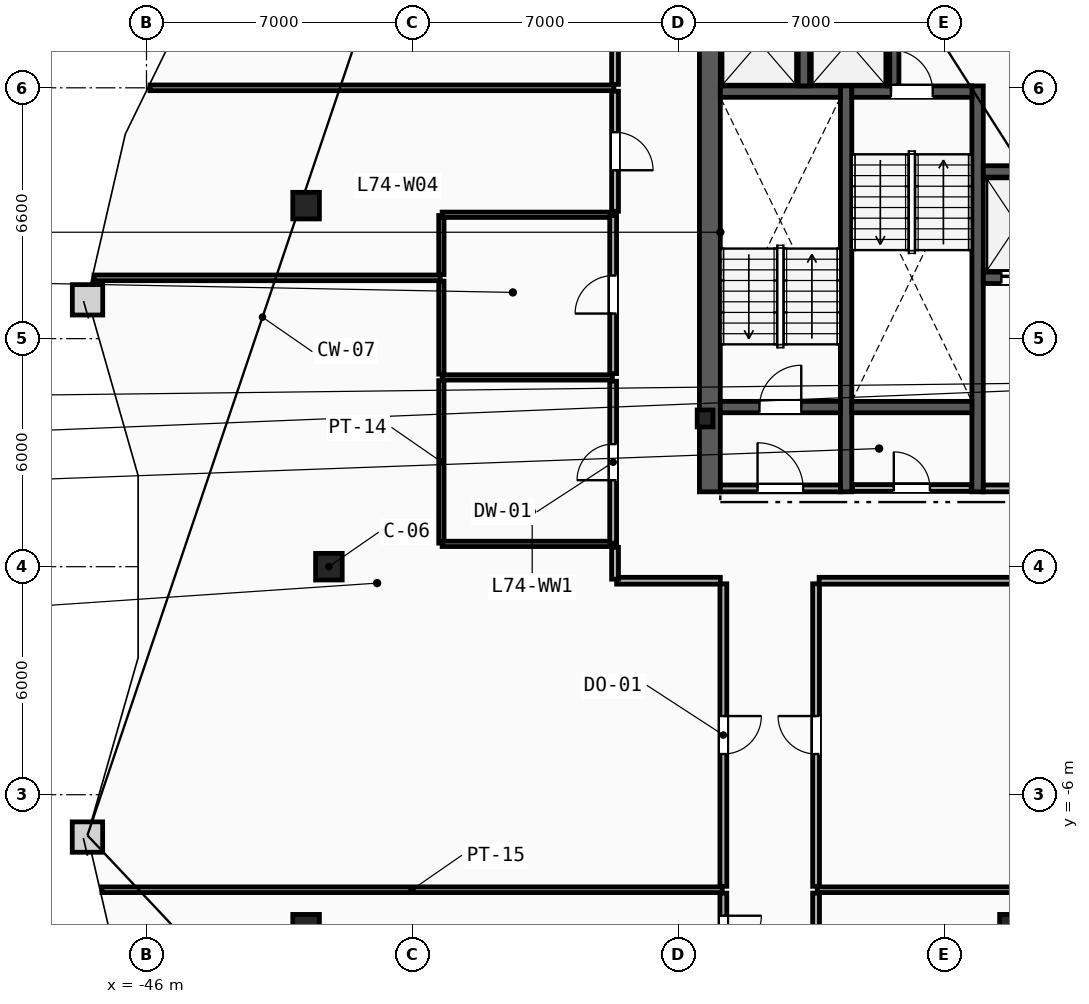
"""IFC4 building model, lengths in metres.
Left out: names, types, materials, properties, quantities, classifications, styles, units other than length and angle.
Written with IfcOpenShell. Run it as: python <this file> out.ifc"""

import sys

from ifc_helpers import new_model, si_unit, direction, frame, frame_2d, origin, origin_2d, place, context, subcontext, project, spatial, rectangle, i_section, extrude, element, fill, save


model = new_model("IFC4")
c1 = context("Model", 3, precision=1e-05, world=origin(), true_north=direction((0.0, 1.0)))
c2 = subcontext(c1, "Body", "Model", "MODEL_VIEW")
j1 = project(units=[si_unit("LENGTHUNIT", "METRE"), si_unit("PLANEANGLEUNIT", "RADIAN")], contexts=[c1])
p1 = place(None, origin())
s1 = spatial("IfcSite", under=j1, at=p1, CompositionType="ELEMENT")
p2 = place(p1, origin())
s2 = spatial("IfcBuilding", under=s1, at=p2, CompositionType="ELEMENT")
p3 = place(p2, frame((0.0, 0.0, 279.2)))
s3 = spatial("IfcBuildingStorey", under=s2, at=p3, CompositionType="ELEMENT", Elevation=279.2)
p4 = place(p3, frame((-31.3, 3.9, 0.0), z_axis=(0.0, 0.0, 1.0), x_axis=(1.0, 0.0, 0.0)))
e1 = element("IfcColumn", 1, at=p4, inside=s3, PredefinedType="COLUMN", context=c2, shape_type="SweptSolid", body=[
    extrude(i_section(OverallWidth=0.416, OverallDepth=0.446, WebThickness=0.039, FlangeThickness=0.063, FilletRadius=0.018, at=origin_2d()), origin(), (0.0, 0.0, 1.0), 3.6),
])
for number, where, z_axis, x_axis in (
    (2, (-41.2, 0.0, 0.0), (0.0, 0.0, 1.0), (1.0, 0.0, 0.0)),
    (3, (-41.8, 9.5, 0.0), (0.0, 0.0, 1.0), (1.0, 0.0, 0.0)),
    (4, (-41.8, -9.5, 0.0), (0.0, 0.0, 1.0), (1.0, 0.0, 0.0)),
    (5, (-23.2, -9.5, 0.0), (0.0, 0.0, 1.0), (1.0, 0.0, 0.0)),
):
    element("IfcColumn", number, at=place(p3, frame(where, z_axis=z_axis, x_axis=x_axis)), inside=s3, PredefinedType="COLUMN", context=c2, shape_type="SweptSolid", body=[
        extrude(rectangle(XDim=0.7, YDim=0.7, at=origin_2d()), origin(), (0.0, 0.0, 1.0), 3.6),
    ])
p5 = place(p3, frame((-31.175, 1.97, 0.0), z_axis=(0.0, 0.0, 1.0), x_axis=(0.0, 1.0, 0.0)))
e6 = element("IfcWall", 6, at=p5, inside=s3, PredefinedType="SHEAR", context=c2, shape_type="SweptSolid", body=[
    extrude(rectangle(XDim=13.33, YDim=0.55, at=frame_2d((6.665, 0.0))), origin(), (0.0, 0.0, 1.0), 3.34),
])
for number, where, z_axis, x_axis in (
    (7, (-27.59, 1.97, 0.0), (0.0, 0.0, 1.0), (0.0, 1.0, 0.0)),
    (8, (-24.13, 1.97, 0.0), (0.0, 0.0, 1.0), (0.0, 1.0, 0.0)),
):
    element("IfcWall", number, at=place(p3, frame(where, z_axis=z_axis, x_axis=x_axis)), inside=s3, PredefinedType="SHEAR", context=c2, shape_type="SweptSolid", body=[
        extrude(rectangle(XDim=10.68, YDim=0.3, at=frame_2d((5.34, 0.0))), origin(), (0.0, 0.0, 1.0), 3.34),
    ])
p6 = place(p3, frame((-30.9, 4.2, 0.0), z_axis=(0.0, 0.0, 1.0), x_axis=(1.0, 0.0, 0.0)))
e9 = element("IfcWall", 9, at=p6, inside=s3, PredefinedType="SHEAR", context=c2, shape_type="SweptSolid", body=[
    extrude(rectangle(XDim=3.16, YDim=0.3, at=frame_2d((1.58, 0.0))), origin(), (0.0, 0.0, 1.0), 3.34),
])
p7 = place(p6, frame((1.03, 0.0, 0.0)))
e10 = element("IfcOpeningElement", 10, at=p7, cuts=e9, PredefinedType="OPENING", context=c2, shape_type="SweptSolid", body=[
    extrude(rectangle(XDim=1.1, YDim=2.15, at=frame_2d((0.55, 1.075))), frame((0.0, 0.16, 0.0), z_axis=(0.0, -1.0, 0.0), x_axis=(1.0, 0.0, 0.0)), (0.0, 0.0, 1.0), 0.32),
])
p8 = place(p3, frame((-30.9, 12.5, 0.0), z_axis=(0.0, 0.0, 1.0), x_axis=(1.0, 0.0, 0.0)))
e11 = element("IfcWall", 11, at=p8, inside=s3, PredefinedType="SHEAR", context=c2, shape_type="SweptSolid", body=[
    extrude(rectangle(XDim=3.16, YDim=0.3, at=frame_2d((1.58, 0.0))), origin(), (0.0, 0.0, 1.0), 3.34),
])
p9 = place(p3, frame((-27.44, 12.5, 0.0), z_axis=(0.0, 0.0, 1.0), x_axis=(1.0, 0.0, 0.0)))
e12 = element("IfcWall", 12, at=p9, inside=s3, PredefinedType="SHEAR", context=c2, shape_type="SweptSolid", body=[
    extrude(rectangle(XDim=3.16, YDim=0.3, at=frame_2d((1.58, 0.0))), origin(), (0.0, 0.0, 1.0), 3.34),
])
p10 = place(p9, frame((1.03, 0.0, 0.0)))
e13 = element("IfcOpeningElement", 13, at=p10, cuts=e12, PredefinedType="OPENING", context=c2, shape_type="SweptSolid", body=[
    extrude(rectangle(XDim=1.1, YDim=2.15, at=frame_2d((0.55, 1.075))), frame((0.0, 0.16, 0.0), z_axis=(0.0, -1.0, 0.0), x_axis=(1.0, 0.0, 0.0)), (0.0, 0.0, 1.0), 0.32),
])
p11 = place(p3, frame((-27.44, 4.2, 0.0), z_axis=(0.0, 0.0, 1.0), x_axis=(1.0, 0.0, 0.0)))
e14 = element("IfcWall", 14, at=p11, inside=s3, PredefinedType="SHEAR", context=c2, shape_type="SweptSolid", body=[
    extrude(rectangle(XDim=3.16, YDim=0.3, at=frame_2d((1.58, 0.0))), origin(), (0.0, 0.0, 1.0), 3.34),
])
p12 = place(p3, frame((-23.98, 2.06, 0.0), z_axis=(0.0, 0.0, 1.0), x_axis=(1.0, 0.0, 0.0)))
e15 = element("IfcWall", 15, at=p12, inside=s3, PredefinedType="PARTITIONING", context=c2, shape_type="SweptSolid", body=[
    extrude(rectangle(XDim=3.0, YDim=0.18, at=frame_2d((1.5, 0.0))), origin(), (0.0, 0.0, 1.0), 3.34),
])
p13 = place(p12, frame((0.9, 0.0, 0.0)))
e16 = element("IfcOpeningElement", 16, at=p13, cuts=e15, PredefinedType="OPENING", context=c2, shape_type="SweptSolid", body=[
    extrude(rectangle(XDim=1.2, YDim=2.15, at=frame_2d((0.6, 1.075))), frame((0.0, 0.1, 0.0), z_axis=(0.0, -1.0, 0.0), x_axis=(1.0, 0.0, 0.0)), (0.0, 0.0, 1.0), 0.2),
])
p14 = place(p3, frame((-30.9, 2.06, 0.0), z_axis=(0.0, 0.0, 1.0), x_axis=(1.0, 0.0, 0.0)))
e17 = element("IfcWall", 17, at=p14, inside=s3, PredefinedType="PARTITIONING", context=c2, shape_type="SweptSolid", body=[
    extrude(rectangle(XDim=3.16, YDim=0.18, at=frame_2d((1.58, 0.0))), origin(), (0.0, 0.0, 1.0), 3.34),
])
p15 = place(p14, frame((0.98, 0.0, 0.0)))
e18 = element("IfcOpeningElement", 18, at=p15, cuts=e17, PredefinedType="OPENING", context=c2, shape_type="SweptSolid", body=[
    extrude(rectangle(XDim=1.2, YDim=2.15, at=frame_2d((0.6, 1.075))), frame((0.0, 0.1, 0.0), z_axis=(0.0, -1.0, 0.0), x_axis=(1.0, 0.0, 0.0)), (0.0, 0.0, 1.0), 0.2),
])
p16 = place(p3, frame((-23.98, 7.6, 0.0), z_axis=(0.0, 0.0, 1.0), x_axis=(1.0, 0.0, 0.0)))
e19 = element("IfcWall", 19, at=p16, inside=s3, PredefinedType="SHEAR", context=c2, shape_type="SweptSolid", body=[
    extrude(rectangle(XDim=2.1, YDim=0.3, at=frame_2d((1.05, 0.0))), origin(), (0.0, 0.0, 1.0), 3.34),
])
p17 = place(p16, frame((0.475, 0.0, 0.0)))
e20 = element("IfcOpeningElement", 20, at=p17, cuts=e19, PredefinedType="OPENING", context=c2, shape_type="SweptSolid", body=[
    extrude(rectangle(XDim=1.15, YDim=2.2, at=frame_2d((0.575, 1.1))), frame((0.0, 0.16, 0.0), z_axis=(0.0, -1.0, 0.0), x_axis=(1.0, 0.0, 0.0)), (0.0, 0.0, 1.0), 0.32),
])
p18 = place(p3, frame((-23.98, 10.4, 0.0), z_axis=(0.0, 0.0, 1.0), x_axis=(1.0, 0.0, 0.0)))
e21 = element("IfcWall", 21, at=p18, inside=s3, PredefinedType="SHEAR", context=c2, shape_type="SweptSolid", body=[
    extrude(rectangle(XDim=2.1, YDim=0.3, at=frame_2d((1.05, 0.0))), origin(), (0.0, 0.0, 1.0), 3.34),
])
for number, where, z_axis, x_axis in (
    (22, (-28.7, 12.65, 0.0), (0.0, 0.0, 1.0), (0.0, 1.0, 0.0)),
    (23, (-26.35, 12.65, 0.0), (0.0, 0.0, 1.0), (0.0, 1.0, 0.0)),
):
    element("IfcWall", number, at=place(p3, frame(where, z_axis=z_axis, x_axis=x_axis)), inside=s3, PredefinedType="SHEAR", context=c2, shape_type="SweptSolid", body=[
        extrude(rectangle(XDim=2.3, YDim=0.3, at=frame_2d((1.15, 0.0))), origin(), (0.0, 0.0, 1.0), 3.34),
    ])
p19 = place(p3, frame((-27.42, 2.07, 0.0), z_axis=(0.0, 0.0, 1.0), x_axis=(1.0, 0.0, 0.0)))
e24 = element("IfcWall", 24, at=p19, inside=s3, PredefinedType="PARTITIONING", context=c2, shape_type="SweptSolid", body=[
    extrude(rectangle(XDim=3.12, YDim=0.18, at=frame_2d((1.56, 0.0))), origin(), (0.0, 0.0, 1.0), 3.34),
])
p20 = place(p19, frame((1.085, 0.0, 0.0)))
e25 = element("IfcOpeningElement", 25, at=p20, cuts=e24, PredefinedType="OPENING", context=c2, shape_type="SweptSolid", body=[
    extrude(rectangle(XDim=0.95, YDim=2.1, at=frame_2d((0.475, 1.05))), frame((0.0, 0.1, 0.0), z_axis=(0.0, -1.0, 0.0), x_axis=(1.0, 0.0, 0.0)), (0.0, 0.0, 1.0), 0.2),
])
p21 = place(p3, frame((-38.24, 0.62, 0.0), z_axis=(0.0, 0.0, 1.0), x_axis=(0.0, 1.0, 0.0)))
e26 = element("IfcWall", 26, at=p21, inside=s3, PredefinedType="PARTITIONING", context=c2, shape_type="SweptSolid", body=[
    extrude(rectangle(XDim=4.275, YDim=0.14, at=frame_2d((2.137, 0.0))), origin(), (0.0, 0.0, 1.0), 3.34),
])
p22 = place(p3, frame((-38.24, 5.065, 0.0), z_axis=(0.0, 0.0, 1.0), x_axis=(0.0, 1.0, 0.0)))
e27 = element("IfcWall", 27, at=p22, inside=s3, PredefinedType="PARTITIONING", context=c2, shape_type="SweptSolid", body=[
    extrude(rectangle(XDim=2.45, YDim=0.14, at=frame_2d((1.225, 0.0))), origin(), (0.0, 0.0, 1.0), 3.34),
])
p23 = place(p3, frame((-38.24, 7.685, 0.0), z_axis=(0.0, 0.0, 1.0), x_axis=(0.0, 1.0, 0.0)))
e28 = element("IfcWall", 28, at=p23, inside=s3, PredefinedType="PARTITIONING", context=c2, shape_type="SweptSolid", body=[
    extrude(rectangle(XDim=1.555, YDim=0.14, at=frame_2d((0.777, 0.0))), origin(), (0.0, 0.0, 1.0), 3.34),
])
for number, where, z_axis, x_axis in (
    (29, (-38.22, 0.6, 0.0), (0.0, 0.0, 1.0), (1.0, 0.0, 0.0)),
    (30, (-38.22, 4.98, 0.0), (0.0, 0.0, 1.0), (1.0, 0.0, 0.0)),
    (31, (-38.22, 9.26, 0.0), (0.0, 0.0, 1.0), (1.0, 0.0, 0.0)),
):
    element("IfcWall", number, at=place(p3, frame(where, z_axis=z_axis, x_axis=x_axis)), inside=s3, PredefinedType="PARTITIONING", context=c2, shape_type="SweptSolid", body=[
        extrude(rectangle(XDim=4.48, YDim=0.14, at=frame_2d((2.24, 0.0))), origin(), (0.0, 0.0, 1.0), 3.34),
    ])
p24 = place(p3, frame((-33.72, 0.62, 0.0), z_axis=(0.0, 0.0, 1.0), x_axis=(0.0, 1.0, 0.0)))
e32 = element("IfcWall", 32, at=p24, inside=s3, PredefinedType="PARTITIONING", context=c2, shape_type="SweptSolid", body=[
    extrude(rectangle(XDim=4.26, YDim=0.18, at=frame_2d((2.13, 0.0))), origin(), (0.0, 0.0, 1.0), 3.34),
])
p25 = place(p24, frame((1.655, 0.0, 0.0)))
e33 = element("IfcOpeningElement", 33, at=p25, cuts=e32, PredefinedType="OPENING", context=c2, shape_type="SweptSolid", body=[
    extrude(rectangle(XDim=0.95, YDim=2.1, at=frame_2d((0.475, 1.05))), frame((0.0, 0.1, 0.0), z_axis=(0.0, -1.0, 0.0), x_axis=(1.0, 0.0, 0.0)), (0.0, 0.0, 1.0), 0.2),
])
p26 = place(p3, frame((-33.72, 5.08, 0.0), z_axis=(0.0, 0.0, 1.0), x_axis=(0.0, 1.0, 0.0)))
e34 = element("IfcWall", 34, at=p26, inside=s3, PredefinedType="PARTITIONING", context=c2, shape_type="SweptSolid", body=[
    extrude(rectangle(XDim=4.16, YDim=0.18, at=frame_2d((2.08, 0.0))), origin(), (0.0, 0.0, 1.0), 3.34),
])
p27 = place(p26, frame((1.58, 0.0, 0.0)))
e35 = element("IfcOpeningElement", 35, at=p27, cuts=e34, PredefinedType="OPENING", context=c2, shape_type="SweptSolid", body=[
    extrude(rectangle(XDim=1.0, YDim=2.15, at=frame_2d((0.5, 1.075))), frame((0.0, 0.1, 0.0), z_axis=(0.0, -1.0, 0.0), x_axis=(1.0, 0.0, 0.0)), (0.0, 0.0, 1.0), 0.2),
])
p28 = place(p3, frame((-47.172, -8.5, 0.0), z_axis=(0.0, 0.0, 1.0), x_axis=(1.0, 0.0, 0.0)))
e36 = element("IfcWall", 36, at=p28, inside=s3, PredefinedType="PARTITIONING", context=c2, shape_type="SweptSolid", body=[
    extrude(rectangle(XDim=16.322, YDim=0.15, at=frame_2d((8.161, 0.0))), origin(), (0.0, 0.0, 1.0), 3.34),
])
p29 = place(p3, frame((-28.35, -8.5, 0.0), z_axis=(0.0, 0.0, 1.0), x_axis=(1.0, 0.0, 0.0)))
e37 = element("IfcWall", 37, at=p29, inside=s3, PredefinedType="PARTITIONING", context=c2, shape_type="SweptSolid", body=[
    extrude(rectangle(XDim=11.522, YDim=0.15, at=frame_2d((5.761, 0.0))), origin(), (0.0, 0.0, 1.0), 3.34),
])
p30 = place(p3, frame((-47.38, 7.6, 0.0), z_axis=(0.0, 0.0, 1.0), x_axis=(1.0, 0.0, 0.0)))
e38 = element("IfcWall", 38, at=p30, inside=s3, PredefinedType="PARTITIONING", context=c2, shape_type="SweptSolid", body=[
    extrude(rectangle(XDim=9.11, YDim=0.15, at=frame_2d((4.555, 0.0))), origin(), (0.0, 0.0, 1.0), 3.34),
])
p31 = place(p3, frame((-45.909, 12.6, 0.0), z_axis=(0.0, 0.0, 1.0), x_axis=(1.0, 0.0, 0.0)))
e39 = element("IfcWall", 39, at=p31, inside=s3, PredefinedType="PARTITIONING", context=c2, shape_type="SweptSolid", body=[
    extrude(rectangle(XDim=12.209, YDim=0.15, at=frame_2d((6.104, 0.0))), origin(), (0.0, 0.0, 1.0), 3.34),
])
p32 = place(p3, frame((-30.82, -8.59, 0.0), z_axis=(0.0, 0.0, 1.0), x_axis=(0.0, -1.0, 0.0)))
e40 = element("IfcWall", 40, at=p32, inside=s3, PredefinedType="PARTITIONING", context=c2, shape_type="SweptSolid", body=[
    extrude(rectangle(XDim=2.188, YDim=0.18, at=frame_2d((1.094, 0.0))), origin(), (0.0, 0.0, 1.0), 3.34),
])
p33 = place(p32, frame((0.594, 0.0, 0.0)))
e41 = element("IfcOpeningElement", 41, at=p33, cuts=e40, PredefinedType="OPENING", context=c2, shape_type="SweptSolid", body=[
    extrude(rectangle(XDim=1.0, YDim=2.15, at=frame_2d((0.5, 1.075))), frame((0.0, 0.1, 0.0), z_axis=(0.0, -1.0, 0.0), x_axis=(1.0, 0.0, 0.0)), (0.0, 0.0, 1.0), 0.2),
])
p34 = place(p3, frame((-28.38, -10.779, 0.0), z_axis=(0.0, 0.0, 1.0), x_axis=(0.0, 1.0, 0.0)))
e42 = element("IfcWall", 42, at=p34, inside=s3, PredefinedType="PARTITIONING", context=c2, shape_type="SweptSolid", body=[
    extrude(rectangle(XDim=2.188, YDim=0.18, at=frame_2d((1.094, 0.0))), origin(), (0.0, 0.0, 1.0), 3.34),
])
p35 = place(p3, frame((-30.82, -0.45, 0.0), z_axis=(0.0, 0.0, 1.0), x_axis=(0.0, -1.0, 0.0)))
e43 = element("IfcWall", 43, at=p35, inside=s3, PredefinedType="PARTITIONING", context=c2, shape_type="SweptSolid", body=[
    extrude(rectangle(XDim=7.96, YDim=0.18, at=frame_2d((3.98, 0.0))), origin(), (0.0, 0.0, 1.0), 3.34),
])
p36 = place(p35, frame((3.48, 0.0, 0.0)))
e44 = element("IfcOpeningElement", 44, at=p36, cuts=e43, PredefinedType="OPENING", context=c2, shape_type="SweptSolid", body=[
    extrude(rectangle(XDim=1.0, YDim=2.15, at=frame_2d((0.5, 1.075))), frame((0.0, 0.1, 0.0), z_axis=(0.0, -1.0, 0.0), x_axis=(1.0, 0.0, 0.0)), (0.0, 0.0, 1.0), 0.2),
])
p37 = place(p3, frame((-33.628, -0.37, 0.0), z_axis=(0.0, 0.0, 1.0), x_axis=(1.0, 0.0, 0.0)))
e45 = element("IfcWall", 45, at=p37, inside=s3, PredefinedType="PARTITIONING", context=c2, shape_type="SweptSolid", body=[
    extrude(rectangle(XDim=2.729, YDim=0.18, at=frame_2d((1.364, 0.0))), origin(), (0.0, 0.0, 1.0), 3.34),
])
p38 = place(p3, frame((-33.67, 0.509, 0.0), z_axis=(0.0, 0.0, 1.0), x_axis=(0.0, -1.0, 0.0)))
e46 = element("IfcWall", 46, at=p38, inside=s3, PredefinedType="PARTITIONING", context=c2, shape_type="SweptSolid", body=[
    extrude(rectangle(XDim=0.837, YDim=0.18, at=frame_2d((0.418, 0.0))), origin(), (0.0, 0.0, 1.0), 3.34),
])
p39 = place(p3, frame((-28.38, -8.41, 0.0), z_axis=(0.0, 0.0, 1.0), x_axis=(0.0, 1.0, 0.0)))
e47 = element("IfcWall", 47, at=p39, inside=s3, PredefinedType="PARTITIONING", context=c2, shape_type="SweptSolid", body=[
    extrude(rectangle(XDim=7.96, YDim=0.18, at=frame_2d((3.98, 0.0))), origin(), (0.0, 0.0, 1.0), 3.34),
])
p40 = place(p39, frame((3.48, 0.0, 0.0)))
e48 = element("IfcOpeningElement", 48, at=p40, cuts=e47, PredefinedType="OPENING", context=c2, shape_type="SweptSolid", body=[
    extrude(rectangle(XDim=1.0, YDim=2.15, at=frame_2d((0.5, 1.075))), frame((0.0, 0.1, 0.0), z_axis=(0.0, -1.0, 0.0), x_axis=(1.0, 0.0, 0.0)), (0.0, 0.0, 1.0), 0.2),
])
p41 = place(p3, frame((-28.3, -0.37, 0.0), z_axis=(0.0, 0.0, 1.0), x_axis=(1.0, 0.0, 0.0)))
e49 = element("IfcWall", 49, at=p41, inside=s3, PredefinedType="PARTITIONING", context=c2, shape_type="SweptSolid", body=[
    extrude(rectangle(XDim=7.479, YDim=0.18, at=frame_2d((3.739, 0.0))), origin(), (0.0, 0.0, 1.0), 3.34),
])
p42 = place(p3, frame((-33.67, 12.51, 0.0), z_axis=(0.0, 0.0, 1.0), x_axis=(0.0, -1.0, 0.0)))
e50 = element("IfcWall", 50, at=p42, inside=s3, PredefinedType="PARTITIONING", context=c2, shape_type="SweptSolid", body=[
    extrude(rectangle(XDim=3.159, YDim=0.18, at=frame_2d((1.579, 0.0))), origin(), (0.0, 0.0, 1.0), 3.34),
])
p43 = place(p42, frame((1.079, 0.0, 0.0)))
e51 = element("IfcOpeningElement", 51, at=p43, cuts=e50, PredefinedType="OPENING", context=c2, shape_type="SweptSolid", body=[
    extrude(rectangle(XDim=1.0, YDim=2.15, at=frame_2d((0.5, 1.075))), frame((0.0, 0.1, 0.0), z_axis=(0.0, -1.0, 0.0), x_axis=(1.0, 0.0, 0.0)), (0.0, 0.0, 1.0), 0.2),
])
p44 = place(p3, frame((-33.67, 17.428, 0.0), z_axis=(0.0, 0.0, 1.0), x_axis=(0.0, -1.0, 0.0)))
e52 = element("IfcWall", 52, at=p44, inside=s3, PredefinedType="PARTITIONING", context=c2, shape_type="SweptSolid", body=[
    extrude(rectangle(XDim=4.739, YDim=0.18, at=frame_2d((2.369, 0.0))), origin(), (0.0, 0.0, 1.0), 3.34),
])
p45 = place(p7, origin())
e53 = element("IfcDoor", 53, at=p45, inside=s3, OperationType="SINGLE_SWING_RIGHT", PredefinedType="DOOR", context=c2, shape_type="SweptSolid", body=[
    extrude(rectangle(XDim=1.1, YDim=2.15, at=frame_2d((0.55, 1.075))), frame((0.0, 0.025, 0.0), z_axis=(0.0, -1.0, 0.0), x_axis=(1.0, 0.0, 0.0)), (0.0, 0.0, 1.0), 0.05),
])
fill(e10, e53)
p46 = place(p10, origin())
e54 = element("IfcDoor", 54, at=p46, inside=s3, OperationType="SINGLE_SWING_LEFT", PredefinedType="DOOR", context=c2, shape_type="SweptSolid", body=[
    extrude(rectangle(XDim=1.1, YDim=2.15, at=frame_2d((0.55, 1.075))), frame((0.0, 0.025, 0.0), z_axis=(0.0, -1.0, 0.0), x_axis=(1.0, 0.0, 0.0)), (0.0, 0.0, 1.0), 0.05),
])
fill(e13, e54)
p47 = place(p15, origin())
e55 = element("IfcDoor", 55, at=p47, inside=s3, OperationType="SINGLE_SWING_LEFT", PredefinedType="DOOR", context=c2, shape_type="SweptSolid", body=[
    extrude(rectangle(XDim=1.2, YDim=2.15, at=frame_2d((0.6, 1.075))), frame((0.0, 0.025, 0.0), z_axis=(0.0, -1.0, 0.0), x_axis=(1.0, 0.0, 0.0)), (0.0, 0.0, 1.0), 0.05),
])
fill(e18, e55)
p48 = place(p17, origin())
e56 = element("IfcDoor", 56, at=p48, inside=s3, OperationType="SLIDING_TO_LEFT", PredefinedType="TRAPDOOR", context=c2, shape_type="SweptSolid", body=[
    extrude(rectangle(XDim=1.15, YDim=2.2, at=frame_2d((0.575, 1.1))), frame((0.0, 0.025, 0.0), z_axis=(0.0, -1.0, 0.0), x_axis=(1.0, 0.0, 0.0)), (0.0, 0.0, 1.0), 0.05),
])
fill(e20, e56)
p49 = place(p36, origin())
e57 = element("IfcDoor", 57, at=p49, inside=s3, OperationType="SINGLE_SWING_LEFT", PredefinedType="DOOR", context=c2, shape_type="SweptSolid", body=[
    extrude(rectangle(XDim=1.0, YDim=2.15, at=frame_2d((0.5, 1.075))), frame((0.0, 0.025, 0.0), z_axis=(0.0, -1.0, 0.0), x_axis=(1.0, 0.0, 0.0)), (0.0, 0.0, 1.0), 0.05),
])
fill(e44, e57)
p50 = place(p40, origin())
e58 = element("IfcDoor", 58, at=p50, inside=s3, OperationType="SINGLE_SWING_RIGHT", PredefinedType="DOOR", context=c2, shape_type="SweptSolid", body=[
    extrude(rectangle(XDim=1.0, YDim=2.15, at=frame_2d((0.5, 1.075))), frame((0.0, 0.025, 0.0), z_axis=(0.0, -1.0, 0.0), x_axis=(1.0, 0.0, 0.0)), (0.0, 0.0, 1.0), 0.05),
])
fill(e48, e58)
p51 = place(p25, origin())
e59 = element("IfcDoor", 59, at=p51, inside=s3, OperationType="SINGLE_SWING_LEFT", PredefinedType="DOOR", context=c2, shape_type="SweptSolid", body=[
    extrude(rectangle(XDim=0.95, YDim=2.1, at=frame_2d((0.475, 1.05))), frame((0.0, 0.025, 0.0), z_axis=(0.0, -1.0, 0.0), x_axis=(1.0, 0.0, 0.0)), (0.0, 0.0, 1.0), 0.05),
])
fill(e33, e59)
p52 = place(p27, origin())
e60 = element("IfcDoor", 60, at=p52, inside=s3, OperationType="SINGLE_SWING_LEFT", PredefinedType="DOOR", context=c2, shape_type="SweptSolid", body=[
    extrude(rectangle(XDim=1.0, YDim=2.15, at=frame_2d((0.5, 1.075))), frame((0.0, 0.025, 0.0), z_axis=(0.0, -1.0, 0.0), x_axis=(1.0, 0.0, 0.0)), (0.0, 0.0, 1.0), 0.05),
])
fill(e35, e60)
p53 = place(p43, origin())
e61 = element("IfcDoor", 61, at=p53, inside=s3, OperationType="SINGLE_SWING_RIGHT", PredefinedType="DOOR", context=c2, shape_type="SweptSolid", body=[
    extrude(rectangle(XDim=1.0, YDim=2.15, at=frame_2d((0.5, 1.075))), frame((0.0, 0.025, 0.0), z_axis=(0.0, -1.0, 0.0), x_axis=(1.0, 0.0, 0.0)), (0.0, 0.0, 1.0), 0.05),
])
fill(e51, e61)
p54 = place(p20, origin())
e62 = element("IfcDoor", 62, at=p54, inside=s3, OperationType="SINGLE_SWING_LEFT", PredefinedType="DOOR", context=c2, shape_type="SweptSolid", body=[
    extrude(rectangle(XDim=0.95, YDim=2.1, at=frame_2d((0.475, 1.05))), frame((0.0, 0.025, 0.0), z_axis=(0.0, -1.0, 0.0), x_axis=(1.0, 0.0, 0.0)), (0.0, 0.0, 1.0), 0.05),
])
fill(e25, e62)
p55 = place(p33, origin())
e63 = element("IfcDoor", 63, at=p55, inside=s3, OperationType="SINGLE_SWING_LEFT", PredefinedType="DOOR", context=c2, shape_type="SweptSolid", body=[
    extrude(rectangle(XDim=1.0, YDim=2.15, at=frame_2d((0.5, 1.075))), frame((0.0, 0.025, 0.0), z_axis=(0.0, -1.0, 0.0), x_axis=(1.0, 0.0, 0.0)), (0.0, 0.0, 1.0), 0.05),
])
fill(e41, e63)
save(model, sys.argv[1])
